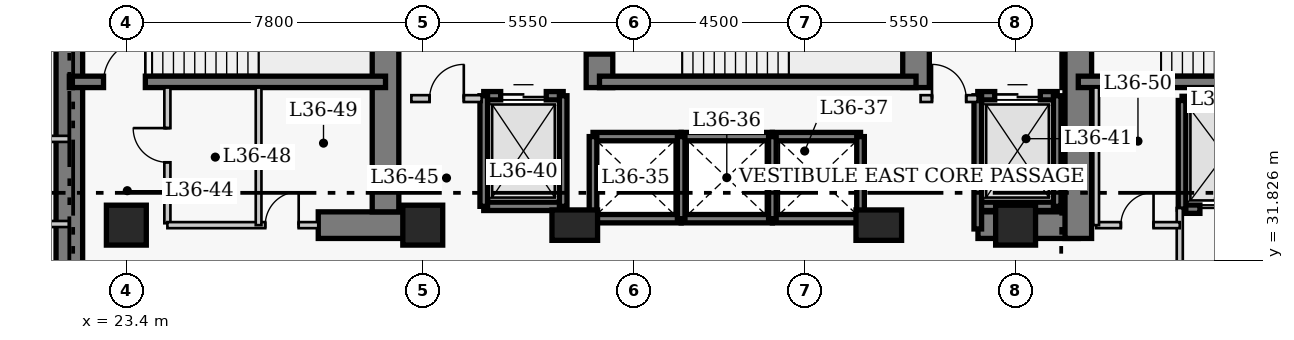
"""IFC4 building model, lengths in metres.
Left out: names, types, materials, properties, quantities, classifications, styles, units other than length and angle.
Written with IfcOpenShell. Run it as: python <this file> out.ifc"""

import sys

from ifc_helpers import new_model, si_unit, direction, frame, frame_2d, origin, origin_2d, place, context, subcontext, project, spatial, rectangle, extrude, element, fill, save


model = new_model("IFC4")
c1 = context("Model", 3, precision=1e-05, world=origin(), true_north=direction((0.0, 1.0)))
c2 = subcontext(c1, "Body", "Model", "MODEL_VIEW")
j1 = project(units=[si_unit("LENGTHUNIT", "METRE"), si_unit("PLANEANGLEUNIT", "RADIAN")], contexts=[c1])
p1 = place(None, origin())
s1 = spatial("IfcSite", under=j1, at=p1, CompositionType="ELEMENT")
p2 = place(p1, origin())
s2 = spatial("IfcBuilding", under=s1, at=p2, CompositionType="ELEMENT")
p3 = place(p2, frame((0.0, 0.0, 146.0)))
s3 = spatial("IfcBuildingStorey", under=s2, at=p3, CompositionType="ELEMENT", Elevation=146.0)
p4 = place(p3, frame((21.9, 27.05, 0.0), z_axis=(0.0, 0.0, 1.0), x_axis=(0.0, 1.0, 0.0)))
e1 = element("IfcWall", 1, at=p4, inside=s3, PredefinedType="SHEAR", context=c2, shape_type="SweptSolid", body=[
    extrude(rectangle(XDim=13.62, YDim=0.7, at=frame_2d((6.81, 0.0))), origin(), (0.0, 0.0, 1.0), 3.8),
])
p5 = place(p3, frame((28.45, 32.75, 0.0), z_axis=(0.0, 0.0, 1.0), x_axis=(1.0, 0.0, 0.0)))
e2 = element("IfcWall", 2, at=p5, inside=s3, PredefinedType="SHEAR", context=c2, shape_type="SweptSolid", body=[
    extrude(rectangle(XDim=2.4, YDim=0.7, at=frame_2d((1.2, 0.0))), origin(), (0.0, 0.0, 1.0), 3.8),
])
p6 = place(p3, frame((45.81, 32.75, 0.0), z_axis=(0.0, 0.0, 1.0), x_axis=(1.0, 0.0, 0.0)))
e3 = element("IfcWall", 3, at=p6, inside=s3, PredefinedType="SHEAR", context=c2, shape_type="SweptSolid", body=[
    extrude(rectangle(XDim=2.64, YDim=0.7, at=frame_2d((1.32, 0.0))), origin(), (0.0, 0.0, 1.0), 3.8),
])
p7 = place(p3, frame((30.22, 33.1, 0.0), z_axis=(0.0, 0.0, 1.0), x_axis=(0.0, 1.0, 0.0)))
e4 = element("IfcWall", 4, at=p7, inside=s3, PredefinedType="SHEAR", context=c2, shape_type="SweptSolid", body=[
    extrude(rectangle(XDim=7.22, YDim=0.7, at=frame_2d((3.61, 0.0))), origin(), (0.0, 0.0, 1.0), 3.8),
])
p8 = place(p3, frame((35.85, 36.37, 0.0), z_axis=(0.0, 0.0, 1.0), x_axis=(0.0, 1.0, 0.0)))
e5 = element("IfcWall", 5, at=p8, inside=s3, PredefinedType="SHEAR", context=c2, shape_type="SweptSolid", body=[
    extrude(rectangle(XDim=3.95, YDim=0.7, at=frame_2d((1.975, 0.0))), origin(), (0.0, 0.0, 1.0), 3.8),
])
p9 = place(p8, frame((0.88, 0.0, 0.0)))
e6 = element("IfcOpeningElement", 6, at=p9, cuts=e5, PredefinedType="OPENING", context=c2, shape_type="SweptSolid", body=[
    extrude(rectangle(XDim=1.1, YDim=2.15, at=frame_2d((0.55, 1.075))), frame((0.0, 0.36, 0.0), z_axis=(0.0, -1.0, 0.0), x_axis=(1.0, 0.0, 0.0)), (0.0, 0.0, 1.0), 0.72),
])
p10 = place(p3, frame((44.18, 36.37, 0.0), z_axis=(0.0, 0.0, 1.0), x_axis=(0.0, 1.0, 0.0)))
e7 = element("IfcWall", 7, at=p10, inside=s3, PredefinedType="SHEAR", context=c2, shape_type="SweptSolid", body=[
    extrude(rectangle(XDim=3.95, YDim=0.7, at=frame_2d((1.975, 0.0))), origin(), (0.0, 0.0, 1.0), 3.8),
])
p11 = place(p3, frame((48.45, 32.4, 0.0), z_axis=(0.0, 0.0, 1.0), x_axis=(0.0, 1.0, 0.0)))
e8 = element("IfcWall", 8, at=p11, inside=s3, PredefinedType="SHEAR", context=c2, shape_type="SweptSolid", body=[
    extrude(rectangle(XDim=7.92, YDim=0.7, at=frame_2d((3.96, 0.0))), origin(), (0.0, 0.0, 1.0), 3.8),
])
p12 = place(p11, frame((5.8, 0.0, 0.0)))
e9 = element("IfcOpeningElement", 9, at=p12, cuts=e8, PredefinedType="OPENING", context=c2, shape_type="SweptSolid", body=[
    extrude(rectangle(XDim=1.1, YDim=2.15, at=frame_2d((0.55, 1.075))), frame((0.0, 0.36, 0.0), z_axis=(0.0, -1.0, 0.0), x_axis=(1.0, 0.0, 0.0)), (0.0, 0.0, 1.0), 0.72),
])
p13 = place(p3, frame((21.9, 36.52, 0.0), z_axis=(0.0, 0.0, 1.0), x_axis=(1.0, 0.0, 0.0)))
e10 = element("IfcWall", 10, at=p13, inside=s3, PredefinedType="SHEAR", context=c2, shape_type="SweptSolid", body=[
    extrude(rectangle(XDim=8.32, YDim=0.3, at=frame_2d((4.16, 0.0))), origin(), (0.0, 0.0, 1.0), 3.8),
])
p14 = place(p13, frame((0.9, 0.0, 0.0)))
e11 = element("IfcOpeningElement", 11, at=p14, cuts=e10, PredefinedType="OPENING", context=c2, shape_type="SweptSolid", body=[
    extrude(rectangle(XDim=1.1, YDim=2.15, at=frame_2d((0.55, 1.075))), frame((0.0, 0.16, 0.0), z_axis=(0.0, -1.0, 0.0), x_axis=(1.0, 0.0, 0.0)), (0.0, 0.0, 1.0), 0.32),
])
p15 = place(p3, frame((35.85, 36.52, 0.0), z_axis=(0.0, 0.0, 1.0), x_axis=(1.0, 0.0, 0.0)))
e12 = element("IfcWall", 12, at=p15, inside=s3, PredefinedType="SHEAR", context=c2, shape_type="SweptSolid", body=[
    extrude(rectangle(XDim=8.33, YDim=0.3, at=frame_2d((4.165, 0.0))), origin(), (0.0, 0.0, 1.0), 3.8),
])
p16 = place(p3, frame((48.45, 36.52, 0.0), z_axis=(0.0, 0.0, 1.0), x_axis=(1.0, 0.0, 0.0)))
e13 = element("IfcWall", 13, at=p16, inside=s3, PredefinedType="SHEAR", context=c2, shape_type="SweptSolid", body=[
    extrude(rectangle(XDim=8.42, YDim=0.3, at=frame_2d((4.21, 0.0))), origin(), (0.0, 0.0, 1.0), 3.8),
])
for number, where, z_axis, x_axis in (
    (14, (23.4, 32.75, 0.0), (0.0, 0.0, 1.0), (1.0, 0.0, 0.0)),
    (15, (31.2, 32.75, 0.0), (0.0, 0.0, 1.0), (1.0, 0.0, 0.0)),
):
    element("IfcColumn", number, at=place(p3, frame(where, z_axis=z_axis, x_axis=x_axis)), inside=s3, PredefinedType="COLUMN", context=c2, shape_type="SweptSolid", body=[
        extrude(rectangle(XDim=1.05, YDim=1.05, at=origin_2d()), origin(), (0.0, 0.0, 1.0), 3.8),
    ])
for number, where, z_axis, x_axis in (
    (16, (35.2, 32.75, 0.0), (0.0, 0.0, 1.0), (1.0, 0.0, 0.0)),
    (17, (43.2, 32.75, 0.0), (0.0, 0.0, 1.0), (1.0, 0.0, 0.0)),
):
    element("IfcColumn", number, at=place(p3, frame(where, z_axis=z_axis, x_axis=x_axis)), inside=s3, PredefinedType="COLUMN", context=c2, shape_type="SweptSolid", body=[
        extrude(rectangle(XDim=1.2, YDim=0.8, at=origin_2d()), origin(), (0.0, 0.0, 1.0), 3.8),
    ])
p17 = place(p3, frame((46.8, 32.75, 0.0), z_axis=(0.0, 0.0, 1.0), x_axis=(1.0, 0.0, 0.0)))
e18 = element("IfcColumn", 18, at=p17, inside=s3, PredefinedType="COLUMN", context=c2, shape_type="SweptSolid", body=[
    extrude(rectangle(XDim=1.05, YDim=1.05, at=origin_2d()), origin(), (0.0, 0.0, 1.0), 3.8),
])
for number, where, z_axis, x_axis in (
    (19, (35.68, 35.08, 0.0), (0.0, 0.0, 1.0), (1.0, 0.0, 0.0)),
    (20, (35.68, 32.92, 0.0), (0.0, 0.0, 1.0), (1.0, 0.0, 0.0)),
):
    element("IfcWall", number, at=place(p3, frame(where, z_axis=z_axis, x_axis=x_axis)), inside=s3, PredefinedType="SHEAR", context=c2, shape_type="SweptSolid", body=[
        extrude(rectangle(XDim=2.32, YDim=0.22, at=frame_2d((1.16, 0.0))), origin(), (0.0, 0.0, 1.0), 3.8),
    ])
p18 = place(p3, frame((35.68, 32.92, 0.0), z_axis=(0.0, 0.0, 1.0), x_axis=(0.0, 1.0, 0.0)))
e21 = element("IfcWall", 21, at=p18, inside=s3, PredefinedType="SHEAR", context=c2, shape_type="SweptSolid", body=[
    extrude(rectangle(XDim=2.16, YDim=0.2, at=frame_2d((1.08, 0.0))), origin(), (0.0, 0.0, 1.0), 3.8),
])
for number, where, z_axis, x_axis in (
    (22, (38.0, 35.08, 0.0), (0.0, 0.0, 1.0), (1.0, 0.0, 0.0)),
    (23, (38.0, 32.92, 0.0), (0.0, 0.0, 1.0), (1.0, 0.0, 0.0)),
):
    element("IfcWall", number, at=place(p3, frame(where, z_axis=z_axis, x_axis=x_axis)), inside=s3, PredefinedType="SHEAR", context=c2, shape_type="SweptSolid", body=[
        extrude(rectangle(XDim=2.4, YDim=0.22, at=frame_2d((1.2, 0.0))), origin(), (0.0, 0.0, 1.0), 3.8),
    ])
p19 = place(p3, frame((38.0, 32.92, 0.0), z_axis=(0.0, 0.0, 1.0), x_axis=(0.0, 1.0, 0.0)))
e24 = element("IfcWall", 24, at=p19, inside=s3, PredefinedType="SHEAR", context=c2, shape_type="SweptSolid", body=[
    extrude(rectangle(XDim=2.16, YDim=0.2, at=frame_2d((1.08, 0.0))), origin(), (0.0, 0.0, 1.0), 3.8),
])
for number, where, z_axis, x_axis in (
    (25, (40.4, 35.08, 0.0), (0.0, 0.0, 1.0), (1.0, 0.0, 0.0)),
    (26, (40.4, 32.92, 0.0), (0.0, 0.0, 1.0), (1.0, 0.0, 0.0)),
):
    element("IfcWall", number, at=place(p3, frame(where, z_axis=z_axis, x_axis=x_axis)), inside=s3, PredefinedType="SHEAR", context=c2, shape_type="SweptSolid", body=[
        extrude(rectangle(XDim=2.32, YDim=0.22, at=frame_2d((1.16, 0.0))), origin(), (0.0, 0.0, 1.0), 3.8),
    ])
for number, where, z_axis, x_axis in (
    (27, (40.4, 32.92, 0.0), (0.0, 0.0, 1.0), (0.0, 1.0, 0.0)),
    (28, (42.72, 32.92, 0.0), (0.0, 0.0, 1.0), (0.0, 1.0, 0.0)),
):
    element("IfcWall", number, at=place(p3, frame(where, z_axis=z_axis, x_axis=x_axis)), inside=s3, PredefinedType="SHEAR", context=c2, shape_type="SweptSolid", body=[
        extrude(rectangle(XDim=2.16, YDim=0.2, at=frame_2d((1.08, 0.0))), origin(), (0.0, 0.0, 1.0), 3.8),
    ])
p20 = place(p3, frame((51.18, 36.03, 0.0), z_axis=(0.0, 0.0, 1.0), x_axis=(1.0, 0.0, 0.0)))
e29 = element("IfcWall", 29, at=p20, inside=s3, PredefinedType="SHEAR", context=c2, shape_type="SweptSolid", body=[
    extrude(rectangle(XDim=2.42, YDim=0.22, at=frame_2d((1.21, 0.0))), origin(), (0.0, 0.0, 1.0), 3.8),
])
p21 = place(p3, frame((51.18, 33.17, 0.0), z_axis=(0.0, 0.0, 1.0), x_axis=(1.0, 0.0, 0.0)))
e30 = element("IfcWall", 30, at=p21, inside=s3, PredefinedType="SHEAR", context=c2, shape_type="SweptSolid", body=[
    extrude(rectangle(XDim=2.42, YDim=0.22, at=frame_2d((1.21, 0.0))), origin(), (0.0, 0.0, 1.0), 3.8),
])
p22 = place(p21, frame((0.47, 0.0, 0.0)))
e31 = element("IfcOpeningElement", 31, at=p22, cuts=e30, PredefinedType="OPENING", context=c2, shape_type="SweptSolid", body=[
    extrude(rectangle(XDim=1.3, YDim=2.15, at=frame_2d((0.65, 1.075))), frame((0.0, 0.12, 0.0), z_axis=(0.0, -1.0, 0.0), x_axis=(1.0, 0.0, 0.0)), (0.0, 0.0, 1.0), 0.24),
])
p23 = place(p3, frame((51.18, 33.17, 0.0), z_axis=(0.0, 0.0, 1.0), x_axis=(0.0, 1.0, 0.0)))
e32 = element("IfcWall", 32, at=p23, inside=s3, PredefinedType="SHEAR", context=c2, shape_type="SweptSolid", body=[
    extrude(rectangle(XDim=2.86, YDim=0.2, at=frame_2d((1.43, 0.0))), origin(), (0.0, 0.0, 1.0), 3.8),
])
p24 = place(p3, frame((32.805, 36.155, 0.0), z_axis=(0.0, 0.0, 1.0), x_axis=(1.0, 0.0, 0.0)))
e33 = element("IfcWall", 33, at=p24, inside=s3, PredefinedType="SHEAR", context=c2, shape_type="SweptSolid", body=[
    extrude(rectangle(XDim=2.09, YDim=0.22, at=frame_2d((1.045, 0.0))), origin(), (0.0, 0.0, 1.0), 3.8),
])
p25 = place(p24, frame((0.445, 0.0, 0.0)))
e34 = element("IfcOpeningElement", 34, at=p25, cuts=e33, PredefinedType="OPENING", context=c2, shape_type="SweptSolid", body=[
    extrude(rectangle(XDim=1.2, YDim=2.15, at=frame_2d((0.6, 1.075))), frame((0.0, 0.12, 0.0), z_axis=(0.0, -1.0, 0.0), x_axis=(1.0, 0.0, 0.0)), (0.0, 0.0, 1.0), 0.24),
])
p26 = place(p3, frame((32.805, 33.245, 0.0), z_axis=(0.0, 0.0, 1.0), x_axis=(1.0, 0.0, 0.0)))
e35 = element("IfcWall", 35, at=p26, inside=s3, PredefinedType="SHEAR", context=c2, shape_type="SweptSolid", body=[
    extrude(rectangle(XDim=2.09, YDim=0.22, at=frame_2d((1.045, 0.0))), origin(), (0.0, 0.0, 1.0), 3.8),
])
for number, where, z_axis, x_axis in (
    (36, (32.805, 33.245, 0.0), (0.0, 0.0, 1.0), (0.0, 1.0, 0.0)),
    (37, (34.895, 33.245, 0.0), (0.0, 0.0, 1.0), (0.0, 1.0, 0.0)),
):
    element("IfcWall", number, at=place(p3, frame(where, z_axis=z_axis, x_axis=x_axis)), inside=s3, PredefinedType="SHEAR", context=c2, shape_type="SweptSolid", body=[
        extrude(rectangle(XDim=2.91, YDim=0.2, at=frame_2d((1.455, 0.0))), origin(), (0.0, 0.0, 1.0), 3.8),
    ])
p27 = place(p3, frame((45.805, 36.155, 0.0), z_axis=(0.0, 0.0, 1.0), x_axis=(1.0, 0.0, 0.0)))
e38 = element("IfcWall", 38, at=p27, inside=s3, PredefinedType="SHEAR", context=c2, shape_type="SweptSolid", body=[
    extrude(rectangle(XDim=2.09, YDim=0.22, at=frame_2d((1.045, 0.0))), origin(), (0.0, 0.0, 1.0), 3.8),
])
p28 = place(p27, frame((0.445, 0.0, 0.0)))
e39 = element("IfcOpeningElement", 39, at=p28, cuts=e38, PredefinedType="OPENING", context=c2, shape_type="SweptSolid", body=[
    extrude(rectangle(XDim=1.2, YDim=2.15, at=frame_2d((0.6, 1.075))), frame((0.0, 0.12, 0.0), z_axis=(0.0, -1.0, 0.0), x_axis=(1.0, 0.0, 0.0)), (0.0, 0.0, 1.0), 0.24),
])
p29 = place(p3, frame((45.805, 33.245, 0.0), z_axis=(0.0, 0.0, 1.0), x_axis=(1.0, 0.0, 0.0)))
e40 = element("IfcWall", 40, at=p29, inside=s3, PredefinedType="SHEAR", context=c2, shape_type="SweptSolid", body=[
    extrude(rectangle(XDim=2.09, YDim=0.22, at=frame_2d((1.045, 0.0))), origin(), (0.0, 0.0, 1.0), 3.8),
])
p30 = place(p3, frame((45.805, 32.65, 0.0), z_axis=(0.0, 0.0, 1.0), x_axis=(0.0, 1.0, 0.0)))
e41 = element("IfcWall", 41, at=p30, inside=s3, PredefinedType="SHEAR", context=c2, shape_type="SweptSolid", body=[
    extrude(rectangle(XDim=3.505, YDim=0.2, at=frame_2d((1.752, 0.0))), origin(), (0.0, 0.0, 1.0), 3.8),
])
p31 = place(p3, frame((47.895, 33.245, 0.0), z_axis=(0.0, 0.0, 1.0), x_axis=(0.0, 1.0, 0.0)))
e42 = element("IfcWall", 42, at=p31, inside=s3, PredefinedType="SHEAR", context=c2, shape_type="SweptSolid", body=[
    extrude(rectangle(XDim=2.91, YDim=0.2, at=frame_2d((1.455, 0.0))), origin(), (0.0, 0.0, 1.0), 3.8),
])
p32 = place(p3, frame((30.9, 36.08, 0.0), z_axis=(0.0, 0.0, 1.0), x_axis=(1.0, 0.0, 0.0)))
e43 = element("IfcWall", 43, at=p32, inside=s3, PredefinedType="PARTITIONING", context=c2, shape_type="SweptSolid", body=[
    extrude(rectangle(XDim=1.85, YDim=0.18, at=frame_2d((0.925, 0.0))), origin(), (0.0, 0.0, 1.0), 3.55),
])
p33 = place(p32, frame((0.48, 0.0, 0.0)))
e44 = element("IfcOpeningElement", 44, at=p33, cuts=e43, PredefinedType="OPENING", context=c2, shape_type="SweptSolid", body=[
    extrude(rectangle(XDim=0.9, YDim=2.15, at=frame_2d((0.45, 1.075))), frame((0.0, 0.1, 0.0), z_axis=(0.0, -1.0, 0.0), x_axis=(1.0, 0.0, 0.0)), (0.0, 0.0, 1.0), 0.2),
])
p34 = place(p3, frame((44.3, 36.08, 0.0), z_axis=(0.0, 0.0, 1.0), x_axis=(1.0, 0.0, 0.0)))
e45 = element("IfcWall", 45, at=p34, inside=s3, PredefinedType="PARTITIONING", context=c2, shape_type="SweptSolid", body=[
    extrude(rectangle(XDim=1.5, YDim=0.18, at=frame_2d((0.75, 0.0))), origin(), (0.0, 0.0, 1.0), 3.55),
])
p35 = place(p34, frame((0.3, 0.0, 0.0)))
e46 = element("IfcOpeningElement", 46, at=p35, cuts=e45, PredefinedType="OPENING", context=c2, shape_type="SweptSolid", body=[
    extrude(rectangle(XDim=0.9, YDim=2.15, at=frame_2d((0.45, 1.075))), frame((0.0, 0.1, 0.0), z_axis=(0.0, -1.0, 0.0), x_axis=(1.0, 0.0, 0.0)), (0.0, 0.0, 1.0), 0.2),
])
p36 = place(p3, frame((24.48, 32.8, 0.0), z_axis=(0.0, 0.0, 1.0), x_axis=(0.0, 1.0, 0.0)))
e47 = element("IfcWall", 47, at=p36, inside=s3, PredefinedType="PARTITIONING", context=c2, shape_type="SweptSolid", body=[
    extrude(rectangle(XDim=3.57, YDim=0.16, at=frame_2d((1.785, 0.0))), origin(), (0.0, 0.0, 1.0), 3.55),
])
p37 = place(p36, frame((1.604, 0.0, 0.0)))
e48 = element("IfcOpeningElement", 48, at=p37, cuts=e47, PredefinedType="OPENING", context=c2, shape_type="SweptSolid", body=[
    extrude(rectangle(XDim=0.9, YDim=2.1, at=frame_2d((0.45, 1.05))), frame((0.0, 0.09, 0.0), z_axis=(0.0, -1.0, 0.0), x_axis=(1.0, 0.0, 0.0)), (0.0, 0.0, 1.0), 0.18),
])
p38 = place(p3, frame((51.12, 29.5, 0.0), z_axis=(0.0, 0.0, 1.0), x_axis=(0.0, 1.0, 0.0)))
e49 = element("IfcWall", 49, at=p38, inside=s3, PredefinedType="PARTITIONING", context=c2, shape_type="SweptSolid", body=[
    extrude(rectangle(XDim=3.7, YDim=0.16, at=frame_2d((1.85, 0.0))), origin(), (0.0, 0.0, 1.0), 3.55),
])
p39 = place(p38, frame((0.9, 0.0, 0.0)))
e50 = element("IfcOpeningElement", 50, at=p39, cuts=e49, PredefinedType="OPENING", context=c2, shape_type="SweptSolid", body=[
    extrude(rectangle(XDim=1.1, YDim=2.15, at=frame_2d((0.55, 1.075))), frame((0.0, 0.09, 0.0), z_axis=(0.0, -1.0, 0.0), x_axis=(1.0, 0.0, 0.0)), (0.0, 0.0, 1.0), 0.18),
])
p40 = place(p3, frame((24.48, 32.75, 0.0), z_axis=(0.0, 0.0, 1.0), x_axis=(1.0, 0.0, 0.0)))
e51 = element("IfcWall", 51, at=p40, inside=s3, PredefinedType="PARTITIONING", context=c2, shape_type="SweptSolid", body=[
    extrude(rectangle(XDim=3.97, YDim=0.16, at=frame_2d((1.985, 0.0))), origin(), (0.0, 0.0, 1.0), 3.55),
])
p41 = place(p40, frame((2.575, 0.0, 0.0)))
e52 = element("IfcOpeningElement", 52, at=p41, cuts=e51, PredefinedType="OPENING", context=c2, shape_type="SweptSolid", body=[
    extrude(rectangle(XDim=0.88, YDim=2.05, at=frame_2d((0.44, 1.025))), frame((0.0, 0.09, 0.0), z_axis=(0.0, -1.0, 0.0), x_axis=(1.0, 0.0, 0.0)), (0.0, 0.0, 1.0), 0.18),
])
p42 = place(p3, frame((48.92, 32.75, 0.0), z_axis=(0.0, 0.0, 1.0), x_axis=(1.0, 0.0, 0.0)))
e53 = element("IfcWall", 53, at=p42, inside=s3, PredefinedType="PARTITIONING", context=c2, shape_type="SweptSolid", body=[
    extrude(rectangle(XDim=2.2, YDim=0.16, at=frame_2d((1.1, 0.0))), origin(), (0.0, 0.0, 1.0), 3.55),
])
p43 = place(p42, frame((0.65, 0.0, 0.0)))
e54 = element("IfcOpeningElement", 54, at=p43, cuts=e53, PredefinedType="OPENING", context=c2, shape_type="SweptSolid", body=[
    extrude(rectangle(XDim=0.86, YDim=2.05, at=frame_2d((0.43, 1.025))), frame((0.0, 0.09, 0.0), z_axis=(0.0, -1.0, 0.0), x_axis=(1.0, 0.0, 0.0)), (0.0, 0.0, 1.0), 0.18),
])
for number, where, z_axis, x_axis in (
    (55, (48.92, 32.75, 0.0), (0.0, 0.0, 1.0), (0.0, 1.0, 0.0)),
    (56, (26.88, 32.75, 0.0), (0.0, 0.0, 1.0), (0.0, 1.0, 0.0)),
):
    element("IfcWall", number, at=place(p3, frame(where, z_axis=z_axis, x_axis=x_axis)), inside=s3, PredefinedType="PARTITIONING", context=c2, shape_type="SweptSolid", body=[
        extrude(rectangle(XDim=3.62, YDim=0.15, at=frame_2d((1.81, 0.0))), origin(), (0.0, 0.0, 1.0), 3.55),
    ])
for number, where, z_axis, x_axis in (
    (57, (19.16, 35.02, 0.0), (0.0, 0.0, 1.0), (1.0, 0.0, 0.0)),
    (58, (19.16, 32.78, 0.0), (0.0, 0.0, 1.0), (1.0, 0.0, 0.0)),
):
    element("IfcWall", number, at=place(p3, frame(where, z_axis=z_axis, x_axis=x_axis)), inside=s3, PredefinedType="PARTITIONING", context=c2, shape_type="SweptSolid", body=[
        extrude(rectangle(XDim=2.74, YDim=0.16, at=frame_2d((1.37, 0.0))), origin(), (0.0, 0.0, 1.0), 3.55),
    ])
p44 = place(p22, origin())
e59 = element("IfcDoor", 59, at=p44, inside=s3, OperationType="DOUBLE_DOOR_SLIDING", PredefinedType="DOOR", context=c2, shape_type="SweptSolid", body=[
    extrude(rectangle(XDim=1.3, YDim=2.15, at=frame_2d((0.65, 1.075))), frame((0.0, 0.025, 0.0), z_axis=(0.0, -1.0, 0.0), x_axis=(1.0, 0.0, 0.0)), (0.0, 0.0, 1.0), 0.05),
])
fill(e31, e59)
p45 = place(p25, origin())
e60 = element("IfcDoor", 60, at=p45, inside=s3, OperationType="DOUBLE_DOOR_SLIDING", PredefinedType="DOOR", context=c2, shape_type="SweptSolid", body=[
    extrude(rectangle(XDim=1.2, YDim=2.15, at=frame_2d((0.6, 1.075))), frame((0.0, 0.025, 0.0), z_axis=(0.0, -1.0, 0.0), x_axis=(1.0, 0.0, 0.0)), (0.0, 0.0, 1.0), 0.05),
])
fill(e34, e60)
p46 = place(p28, origin())
e61 = element("IfcDoor", 61, at=p46, inside=s3, OperationType="DOUBLE_DOOR_SLIDING", PredefinedType="DOOR", context=c2, shape_type="SweptSolid", body=[
    extrude(rectangle(XDim=1.2, YDim=2.15, at=frame_2d((0.6, 1.075))), frame((0.0, 0.025, 0.0), z_axis=(0.0, -1.0, 0.0), x_axis=(1.0, 0.0, 0.0)), (0.0, 0.0, 1.0), 0.05),
])
fill(e39, e61)
p47 = place(p33, origin())
e62 = element("IfcDoor", 62, at=p47, inside=s3, OperationType="SINGLE_SWING_RIGHT", PredefinedType="DOOR", context=c2, shape_type="SweptSolid", body=[
    extrude(rectangle(XDim=0.9, YDim=2.15, at=frame_2d((0.45, 1.075))), frame((0.0, 0.025, 0.0), z_axis=(0.0, -1.0, 0.0), x_axis=(1.0, 0.0, 0.0)), (0.0, 0.0, 1.0), 0.05),
])
fill(e44, e62)
p48 = place(p35, origin())
e63 = element("IfcDoor", 63, at=p48, inside=s3, OperationType="SINGLE_SWING_LEFT", PredefinedType="DOOR", context=c2, shape_type="SweptSolid", body=[
    extrude(rectangle(XDim=0.9, YDim=2.15, at=frame_2d((0.45, 1.075))), frame((0.0, 0.025, 0.0), z_axis=(0.0, -1.0, 0.0), x_axis=(1.0, 0.0, 0.0)), (0.0, 0.0, 1.0), 0.05),
])
fill(e46, e63)
p49 = place(p37, origin())
e64 = element("IfcDoor", 64, at=p49, inside=s3, OperationType="SINGLE_SWING_RIGHT", PredefinedType="DOOR", context=c2, shape_type="SweptSolid", body=[
    extrude(rectangle(XDim=0.9, YDim=2.1, at=frame_2d((0.45, 1.05))), frame((0.0, 0.025, 0.0), z_axis=(0.0, -1.0, 0.0), x_axis=(1.0, 0.0, 0.0)), (0.0, 0.0, 1.0), 0.05),
])
fill(e48, e64)
p50 = place(p41, origin())
e65 = element("IfcDoor", 65, at=p50, inside=s3, OperationType="SINGLE_SWING_RIGHT", PredefinedType="DOOR", context=c2, shape_type="SweptSolid", body=[
    extrude(rectangle(XDim=0.88, YDim=2.05, at=frame_2d((0.44, 1.025))), frame((0.0, 0.025, 0.0), z_axis=(0.0, -1.0, 0.0), x_axis=(1.0, 0.0, 0.0)), (0.0, 0.0, 1.0), 0.05),
])
fill(e52, e65)
p51 = place(p43, origin())
e66 = element("IfcDoor", 66, at=p51, inside=s3, OperationType="SINGLE_SWING_RIGHT", PredefinedType="DOOR", context=c2, shape_type="SweptSolid", body=[
    extrude(rectangle(XDim=0.86, YDim=2.05, at=frame_2d((0.43, 1.025))), frame((0.0, 0.025, 0.0), z_axis=(0.0, -1.0, 0.0), x_axis=(1.0, 0.0, 0.0)), (0.0, 0.0, 1.0), 0.05),
])
fill(e54, e66)
p52 = place(p14, origin())
e67 = element("IfcDoor", 67, at=p52, inside=s3, OperationType="SINGLE_SWING_RIGHT", PredefinedType="DOOR", context=c2, shape_type="SweptSolid", body=[
    extrude(rectangle(XDim=1.1, YDim=2.15, at=frame_2d((0.55, 1.075))), frame((0.0, 0.025, 0.0), z_axis=(0.0, -1.0, 0.0), x_axis=(1.0, 0.0, 0.0)), (0.0, 0.0, 1.0), 0.05),
])
fill(e11, e67)
p53 = place(p9, origin())
e68 = element("IfcDoor", 68, at=p53, inside=s3, OperationType="SINGLE_SWING_RIGHT", PredefinedType="DOOR", context=c2, shape_type="SweptSolid", body=[
    extrude(rectangle(XDim=1.1, YDim=2.15, at=frame_2d((0.55, 1.075))), frame((0.0, 0.025, 0.0), z_axis=(0.0, -1.0, 0.0), x_axis=(1.0, 0.0, 0.0)), (0.0, 0.0, 1.0), 0.05),
])
fill(e6, e68)
save(model, sys.argv[1])
